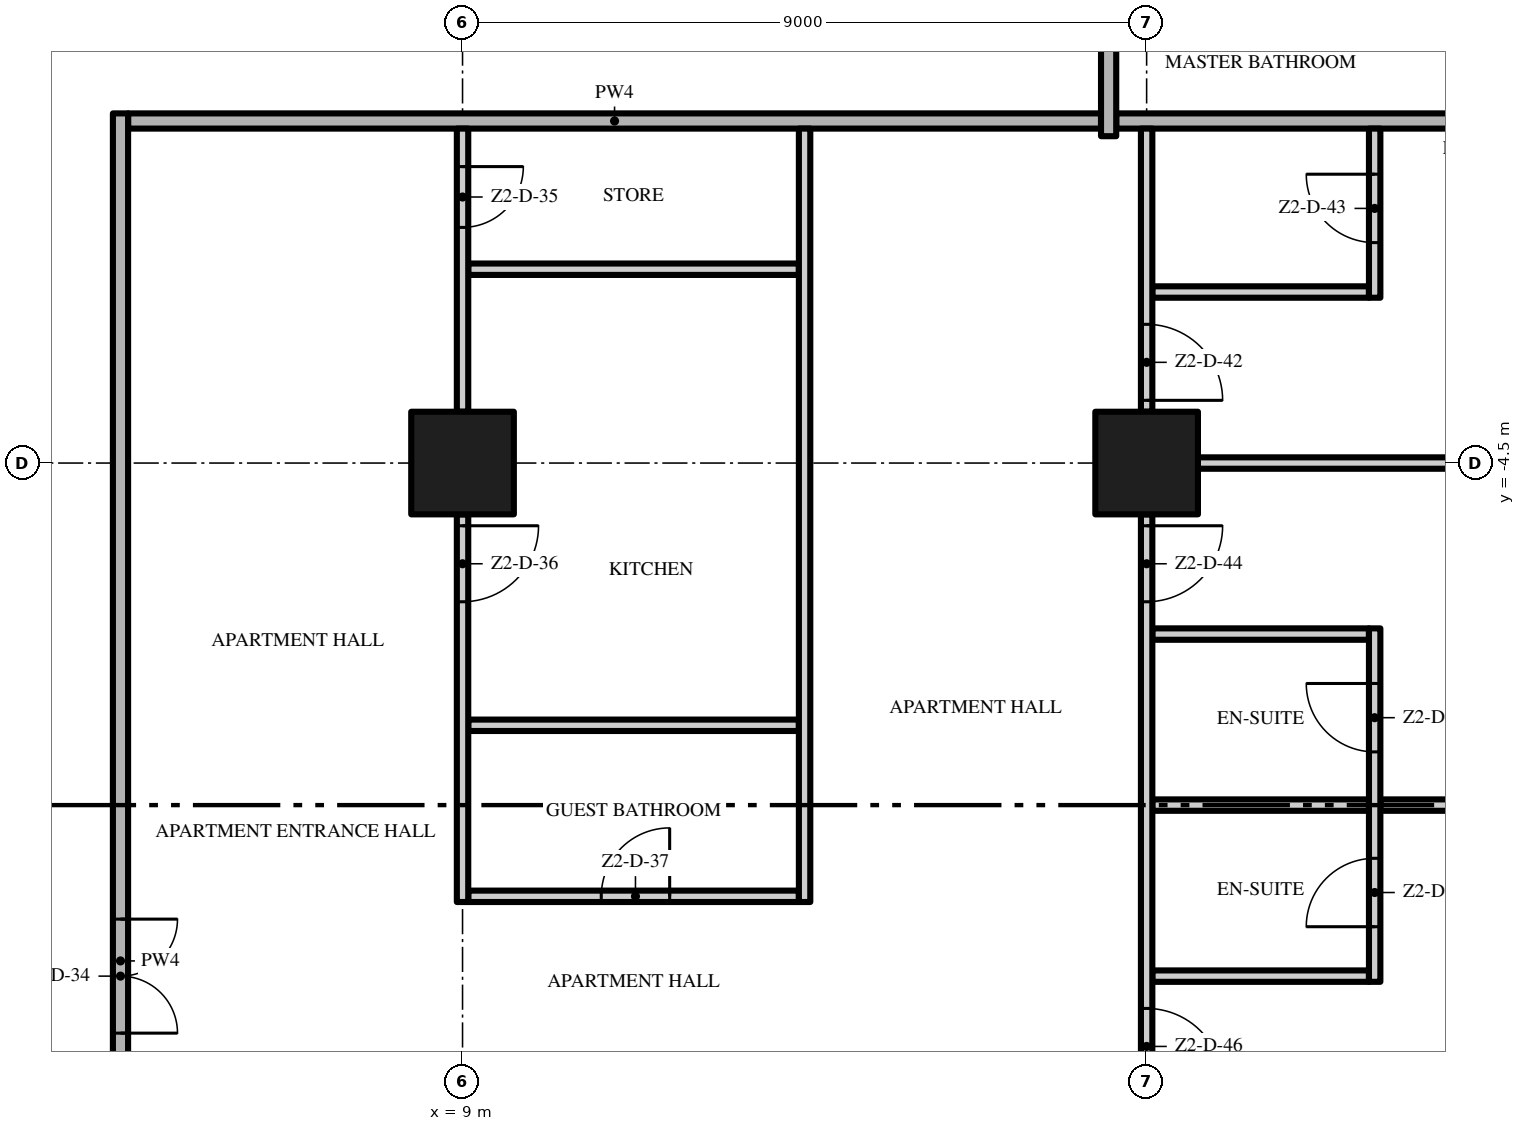
"""IFC4 building model, lengths in metres.
Left out: names, types, materials, properties, quantities, classifications, styles, units other than length and angle.
Written with IfcOpenShell. Run it as: python <this file> out.ifc"""

import sys

from ifc_helpers import new_model, si_unit, direction, frame, frame_2d, origin, origin_2d, place, context, subcontext, project, spatial, rectangle, extrude, element, fill, save


model = new_model("IFC4")
c1 = context("Model", 3, precision=1e-05, world=origin(), true_north=direction((0.0, 1.0)))
c2 = subcontext(c1, "Body", "Model", "MODEL_VIEW")
j1 = project(units=[si_unit("LENGTHUNIT", "METRE"), si_unit("PLANEANGLEUNIT", "RADIAN")], contexts=[c1])
p1 = place(None, origin())
s1 = spatial("IfcSite", under=j1, at=p1, CompositionType="ELEMENT")
p2 = place(p1, origin())
s2 = spatial("IfcBuilding", under=s1, at=p2, CompositionType="ELEMENT")
p3 = place(p2, frame((0.0, 0.0, 103.6)))
s3 = spatial("IfcBuildingStorey", under=s2, at=p3, CompositionType="ELEMENT", Elevation=103.6)
for number, where, z_axis, x_axis in (
    (1, (18.0, -4.5, 0.0), (0.0, 0.0, 1.0), (1.0, 0.0, 0.0)),
    (2, (9.0, -4.5, 0.0), (0.0, 0.0, 1.0), (1.0, 0.0, 0.0)),
):
    element("IfcColumn", number, at=place(p3, frame(where, z_axis=z_axis, x_axis=x_axis)), inside=s3, PredefinedType="COLUMN", context=c2, shape_type="SweptSolid", body=[
        extrude(rectangle(XDim=1.35, YDim=1.35, at=origin_2d()), origin(), (0.0, 0.0, 1.0), 3.5),
    ])
p4 = place(p3, frame((18.075, -11.25, 0.0), z_axis=(0.0, 0.0, 1.0), x_axis=(1.0, 0.0, 0.0)))
e3 = element("IfcWall", 3, at=p4, inside=s3, PredefinedType="PARTITIONING", context=c2, shape_type="SweptSolid", body=[
    extrude(rectangle(XDim=2.85, YDim=0.15, at=frame_2d((1.425, 0.0))), origin(), (0.0, 0.0, 1.0), 3.5),
])
p5 = place(p3, frame((9.075, -10.2, 0.0), z_axis=(0.0, 0.0, 1.0), x_axis=(1.0, 0.0, 0.0)))
e4 = element("IfcWall", 4, at=p5, inside=s3, PredefinedType="PARTITIONING", context=c2, shape_type="SweptSolid", body=[
    extrude(rectangle(XDim=4.35, YDim=0.15, at=frame_2d((2.175, 0.0))), origin(), (0.0, 0.0, 1.0), 3.5),
])
p6 = place(p5, frame((1.75, 0.0, 0.0)))
e5 = element("IfcOpeningElement", 5, at=p6, cuts=e4, PredefinedType="OPENING", context=c2, shape_type="SweptSolid", body=[
    extrude(rectangle(XDim=0.9, YDim=2.1, at=frame_2d((0.45, 1.05))), frame((0.0, 0.085, 0.0), z_axis=(0.0, -1.0, 0.0), x_axis=(1.0, 0.0, 0.0)), (0.0, 0.0, 1.0), 0.17),
])
p7 = place(p3, frame((18.075, -9.0, 0.0), z_axis=(0.0, 0.0, 1.0), x_axis=(1.0, 0.0, 0.0)))
e6 = element("IfcWall", 6, at=p7, inside=s3, PredefinedType="PARTITIONING", context=c2, shape_type="SweptSolid", body=[
    extrude(rectangle(XDim=2.85, YDim=0.15, at=frame_2d((1.425, 0.0))), origin(), (0.0, 0.0, 1.0), 3.5),
])
p8 = place(p3, frame((21.075, -9.0, 0.0), z_axis=(0.0, 0.0, 1.0), x_axis=(1.0, 0.0, 0.0)))
e7 = element("IfcWall", 7, at=p8, inside=s3, PredefinedType="PARTITIONING", context=c2, shape_type="SweptSolid", body=[
    extrude(rectangle(XDim=5.625, YDim=0.15, at=frame_2d((2.812, 0.0))), origin(), (0.0, 0.0, 1.0), 3.5),
])
p9 = place(p3, frame((9.075, -7.95, 0.0), z_axis=(0.0, 0.0, 1.0), x_axis=(1.0, 0.0, 0.0)))
e8 = element("IfcWall", 8, at=p9, inside=s3, PredefinedType="PARTITIONING", context=c2, shape_type="SweptSolid", body=[
    extrude(rectangle(XDim=4.35, YDim=0.15, at=frame_2d((2.175, 0.0))), origin(), (0.0, 0.0, 1.0), 3.5),
])
p10 = place(p3, frame((18.075, -6.75, 0.0), z_axis=(0.0, 0.0, 1.0), x_axis=(1.0, 0.0, 0.0)))
e9 = element("IfcWall", 9, at=p10, inside=s3, PredefinedType="PARTITIONING", context=c2, shape_type="SweptSolid", body=[
    extrude(rectangle(XDim=2.85, YDim=0.15, at=frame_2d((1.425, 0.0))), origin(), (0.0, 0.0, 1.0), 3.5),
])
p11 = place(p3, frame((18.675, -4.5, 0.0), z_axis=(0.0, 0.0, 1.0), x_axis=(1.0, 0.0, 0.0)))
e10 = element("IfcWall", 10, at=p11, inside=s3, PredefinedType="PARTITIONING", context=c2, shape_type="SweptSolid", body=[
    extrude(rectangle(XDim=7.075, YDim=0.15, at=frame_2d((3.538, 0.0))), origin(), (0.0, 0.0, 1.0), 3.5),
])
p12 = place(p3, frame((18.075, -2.25, 0.0), z_axis=(0.0, 0.0, 1.0), x_axis=(1.0, 0.0, 0.0)))
e11 = element("IfcWall", 11, at=p12, inside=s3, PredefinedType="PARTITIONING", context=c2, shape_type="SweptSolid", body=[
    extrude(rectangle(XDim=2.85, YDim=0.15, at=frame_2d((1.425, 0.0))), origin(), (0.0, 0.0, 1.0), 3.5),
])
p13 = place(p3, frame((9.075, -1.95, 0.0), z_axis=(0.0, 0.0, 1.0), x_axis=(1.0, 0.0, 0.0)))
e12 = element("IfcWall", 12, at=p13, inside=s3, PredefinedType="PARTITIONING", context=c2, shape_type="SweptSolid", body=[
    extrude(rectangle(XDim=4.35, YDim=0.15, at=frame_2d((2.175, 0.0))), origin(), (0.0, 0.0, 1.0), 3.5),
])
p14 = place(p3, frame((4.6, 0.0, 0.0), z_axis=(0.0, 0.0, 1.0), x_axis=(1.0, 0.0, 0.0)))
e13 = element("IfcWall", 13, at=p14, inside=s3, PredefinedType="PARTITIONING", context=c2, shape_type="SweptSolid", body=[
    extrude(rectangle(XDim=12.8, YDim=0.2, at=frame_2d((6.4, 0.0))), origin(), (0.0, 0.0, 1.0), 3.5),
])
p15 = place(p3, frame((17.6, 0.0, 0.0), z_axis=(0.0, 0.0, 1.0), x_axis=(1.0, 0.0, 0.0)))
e14 = element("IfcWall", 14, at=p15, inside=s3, PredefinedType="PARTITIONING", context=c2, shape_type="SweptSolid", body=[
    extrude(rectangle(XDim=9.1, YDim=0.2, at=frame_2d((4.55, 0.0))), origin(), (0.0, 0.0, 1.0), 3.5),
])
p16 = place(p3, frame((4.5, 0.1, 0.0), z_axis=(0.0, 0.0, 1.0), x_axis=(0.0, -1.0, 0.0)))
e15 = element("IfcWall", 15, at=p16, inside=s3, PredefinedType="PARTITIONING", context=c2, shape_type="SweptSolid", body=[
    extrude(rectangle(XDim=22.3, YDim=0.2, at=frame_2d((11.15, 0.0))), origin(), (0.0, 0.0, 1.0), 3.5),
])
p17 = place(p16, frame((10.6, 0.0, 0.0)))
e16 = element("IfcOpeningElement", 16, at=p17, cuts=e15, PredefinedType="OPENING", context=c2, shape_type="SweptSolid", body=[
    extrude(rectangle(XDim=1.5, YDim=2.4, at=frame_2d((0.75, 1.2))), frame((0.0, 0.11, 0.0), z_axis=(0.0, -1.0, 0.0), x_axis=(1.0, 0.0, 0.0)), (0.0, 0.0, 1.0), 0.22),
])
p18 = place(p3, frame((9.0, -5.175, 0.0), z_axis=(0.0, 0.0, 1.0), x_axis=(0.0, -1.0, 0.0)))
e17 = element("IfcWall", 17, at=p18, inside=s3, PredefinedType="PARTITIONING", context=c2, shape_type="SweptSolid", body=[
    extrude(rectangle(XDim=5.1, YDim=0.15, at=frame_2d((2.55, 0.0))), origin(), (0.0, 0.0, 1.0), 3.5),
])
p19 = place(p18, frame((0.15, 0.0, 0.0)))
e18 = element("IfcOpeningElement", 18, at=p19, cuts=e17, PredefinedType="OPENING", context=c2, shape_type="SweptSolid", body=[
    extrude(rectangle(XDim=1.0, YDim=2.4, at=frame_2d((0.5, 1.2))), frame((0.0, 0.085, 0.0), z_axis=(0.0, -1.0, 0.0), x_axis=(1.0, 0.0, 0.0)), (0.0, 0.0, 1.0), 0.17),
])
p20 = place(p3, frame((9.0, -0.1, 0.0), z_axis=(0.0, 0.0, 1.0), x_axis=(0.0, -1.0, 0.0)))
e19 = element("IfcWall", 19, at=p20, inside=s3, PredefinedType="PARTITIONING", context=c2, shape_type="SweptSolid", body=[
    extrude(rectangle(XDim=3.725, YDim=0.15, at=frame_2d((1.863, 0.0))), origin(), (0.0, 0.0, 1.0), 3.5),
])
p21 = place(p20, frame((0.5, 0.0, 0.0)))
e20 = element("IfcOpeningElement", 20, at=p21, cuts=e19, PredefinedType="OPENING", context=c2, shape_type="SweptSolid", body=[
    extrude(rectangle(XDim=0.8, YDim=2.0, at=frame_2d((0.4, 1.0))), frame((0.0, 0.085, 0.0), z_axis=(0.0, -1.0, 0.0), x_axis=(1.0, 0.0, 0.0)), (0.0, 0.0, 1.0), 0.17),
])
p22 = place(p3, frame((13.5, -10.275, 0.0), z_axis=(0.0, 0.0, 1.0), x_axis=(0.0, 1.0, 0.0)))
e21 = element("IfcWall", 21, at=p22, inside=s3, PredefinedType="PARTITIONING", context=c2, shape_type="SweptSolid", body=[
    extrude(rectangle(XDim=10.175, YDim=0.15, at=frame_2d((5.088, 0.0))), origin(), (0.0, 0.0, 1.0), 3.5),
])
p23 = place(p3, frame((17.5, -0.2, 0.0), z_axis=(0.0, 0.0, 1.0), x_axis=(0.0, 1.0, 0.0)))
e22 = element("IfcWall", 22, at=p23, inside=s3, PredefinedType="PARTITIONING", context=c2, shape_type="SweptSolid", body=[
    extrude(rectangle(XDim=4.025, YDim=0.2, at=frame_2d((2.013, 0.0))), origin(), (0.0, 0.0, 1.0), 3.5),
])
p24 = place(p3, frame((18.0, -5.175, 0.0), z_axis=(0.0, 0.0, 1.0), x_axis=(0.0, -1.0, 0.0)))
e23 = element("IfcWall", 23, at=p24, inside=s3, PredefinedType="PARTITIONING", context=c2, shape_type="SweptSolid", body=[
    extrude(rectangle(XDim=7.65, YDim=0.15, at=frame_2d((3.825, 0.0))), origin(), (0.0, 0.0, 1.0), 3.5),
])
p25 = place(p24, frame((0.15, 0.0, 0.0)))
e24 = element("IfcOpeningElement", 24, at=p25, cuts=e23, PredefinedType="OPENING", context=c2, shape_type="SweptSolid", body=[
    extrude(rectangle(XDim=1.0, YDim=2.4, at=frame_2d((0.5, 1.2))), frame((0.0, 0.085, 0.0), z_axis=(0.0, -1.0, 0.0), x_axis=(1.0, 0.0, 0.0)), (0.0, 0.0, 1.0), 0.17),
])
p26 = place(p24, frame((6.5, 0.0, 0.0)))
e25 = element("IfcOpeningElement", 25, at=p26, cuts=e23, PredefinedType="OPENING", context=c2, shape_type="SweptSolid", body=[
    extrude(rectangle(XDim=1.0, YDim=2.4, at=frame_2d((0.5, 1.2))), frame((0.0, 0.085, 0.0), z_axis=(0.0, -1.0, 0.0), x_axis=(1.0, 0.0, 0.0)), (0.0, 0.0, 1.0), 0.17),
])
p27 = place(p3, frame((18.0, -0.1, 0.0), z_axis=(0.0, 0.0, 1.0), x_axis=(0.0, -1.0, 0.0)))
e26 = element("IfcWall", 26, at=p27, inside=s3, PredefinedType="PARTITIONING", context=c2, shape_type="SweptSolid", body=[
    extrude(rectangle(XDim=3.725, YDim=0.15, at=frame_2d((1.863, 0.0))), origin(), (0.0, 0.0, 1.0), 3.5),
])
p28 = place(p27, frame((2.575, 0.0, 0.0)))
e27 = element("IfcOpeningElement", 27, at=p28, cuts=e26, PredefinedType="OPENING", context=c2, shape_type="SweptSolid", body=[
    extrude(rectangle(XDim=1.0, YDim=2.4, at=frame_2d((0.5, 1.2))), frame((0.0, 0.085, 0.0), z_axis=(0.0, -1.0, 0.0), x_axis=(1.0, 0.0, 0.0)), (0.0, 0.0, 1.0), 0.17),
])
p29 = place(p3, frame((21.0, -11.325, 0.0), z_axis=(0.0, 0.0, 1.0), x_axis=(0.0, 1.0, 0.0)))
e28 = element("IfcWall", 28, at=p29, inside=s3, PredefinedType="PARTITIONING", context=c2, shape_type="SweptSolid", body=[
    extrude(rectangle(XDim=4.65, YDim=0.15, at=frame_2d((2.325, 0.0))), origin(), (0.0, 0.0, 1.0), 3.5),
])
p30 = place(p29, frame((3.025, 0.0, 0.0)))
e29 = element("IfcOpeningElement", 29, at=p30, cuts=e28, PredefinedType="OPENING", context=c2, shape_type="SweptSolid", body=[
    extrude(rectangle(XDim=0.9, YDim=2.1, at=frame_2d((0.45, 1.05))), frame((0.0, 0.085, 0.0), z_axis=(0.0, -1.0, 0.0), x_axis=(1.0, 0.0, 0.0)), (0.0, 0.0, 1.0), 0.17),
])
p31 = place(p29, frame((0.725, 0.0, 0.0)))
e30 = element("IfcOpeningElement", 30, at=p31, cuts=e28, PredefinedType="OPENING", context=c2, shape_type="SweptSolid", body=[
    extrude(rectangle(XDim=0.9, YDim=2.1, at=frame_2d((0.45, 1.05))), frame((0.0, 0.085, 0.0), z_axis=(0.0, -1.0, 0.0), x_axis=(1.0, 0.0, 0.0)), (0.0, 0.0, 1.0), 0.17),
])
p32 = place(p3, frame((21.0, -2.325, 0.0), z_axis=(0.0, 0.0, 1.0), x_axis=(0.0, 1.0, 0.0)))
e31 = element("IfcWall", 31, at=p32, inside=s3, PredefinedType="PARTITIONING", context=c2, shape_type="SweptSolid", body=[
    extrude(rectangle(XDim=2.225, YDim=0.15, at=frame_2d((1.113, 0.0))), origin(), (0.0, 0.0, 1.0), 3.5),
])
p33 = place(p32, frame((0.725, 0.0, 0.0)))
e32 = element("IfcOpeningElement", 32, at=p33, cuts=e31, PredefinedType="OPENING", context=c2, shape_type="SweptSolid", body=[
    extrude(rectangle(XDim=0.9, YDim=2.1, at=frame_2d((0.45, 1.05))), frame((0.0, 0.085, 0.0), z_axis=(0.0, -1.0, 0.0), x_axis=(1.0, 0.0, 0.0)), (0.0, 0.0, 1.0), 0.17),
])
p34 = place(p17, origin())
e33 = element("IfcDoor", 33, at=p34, inside=s3, OperationType="DOUBLE_DOOR_SINGLE_SWING", PredefinedType="DOOR", context=c2, shape_type="SweptSolid", body=[
    extrude(rectangle(XDim=1.5, YDim=2.4, at=frame_2d((0.75, 1.2))), frame((0.0, 0.025, 0.0), z_axis=(0.0, -1.0, 0.0), x_axis=(1.0, 0.0, 0.0)), (0.0, 0.0, 1.0), 0.05),
])
fill(e16, e33)
p35 = place(p21, origin())
e34 = element("IfcDoor", 34, at=p35, inside=s3, OperationType="SINGLE_SWING_LEFT", PredefinedType="DOOR", context=c2, shape_type="SweptSolid", body=[
    extrude(rectangle(XDim=0.8, YDim=2.0, at=frame_2d((0.4, 1.0))), frame((0.0, 0.025, 0.0), z_axis=(0.0, -1.0, 0.0), x_axis=(1.0, 0.0, 0.0)), (0.0, 0.0, 1.0), 0.05),
])
fill(e20, e34)
p36 = place(p19, origin())
e35 = element("IfcDoor", 35, at=p36, inside=s3, OperationType="SINGLE_SWING_LEFT", PredefinedType="DOOR", context=c2, shape_type="SweptSolid", body=[
    extrude(rectangle(XDim=1.0, YDim=2.4, at=frame_2d((0.5, 1.2))), frame((0.0, 0.025, 0.0), z_axis=(0.0, -1.0, 0.0), x_axis=(1.0, 0.0, 0.0)), (0.0, 0.0, 1.0), 0.05),
])
fill(e18, e35)
p37 = place(p6, origin())
e36 = element("IfcDoor", 36, at=p37, inside=s3, OperationType="SINGLE_SWING_RIGHT", PredefinedType="DOOR", context=c2, shape_type="SweptSolid", body=[
    extrude(rectangle(XDim=0.9, YDim=2.1, at=frame_2d((0.45, 1.05))), frame((0.0, 0.025, 0.0), z_axis=(0.0, -1.0, 0.0), x_axis=(1.0, 0.0, 0.0)), (0.0, 0.0, 1.0), 0.05),
])
fill(e5, e36)
p38 = place(p28, origin())
e37 = element("IfcDoor", 37, at=p38, inside=s3, OperationType="SINGLE_SWING_RIGHT", PredefinedType="DOOR", context=c2, shape_type="SweptSolid", body=[
    extrude(rectangle(XDim=1.0, YDim=2.4, at=frame_2d((0.5, 1.2))), frame((0.0, 0.025, 0.0), z_axis=(0.0, -1.0, 0.0), x_axis=(1.0, 0.0, 0.0)), (0.0, 0.0, 1.0), 0.05),
])
fill(e27, e37)
p39 = place(p33, origin())
e38 = element("IfcDoor", 38, at=p39, inside=s3, OperationType="SINGLE_SWING_RIGHT", PredefinedType="DOOR", context=c2, shape_type="SweptSolid", body=[
    extrude(rectangle(XDim=0.9, YDim=2.1, at=frame_2d((0.45, 1.05))), frame((0.0, 0.025, 0.0), z_axis=(0.0, -1.0, 0.0), x_axis=(1.0, 0.0, 0.0)), (0.0, 0.0, 1.0), 0.05),
])
fill(e32, e38)
p40 = place(p25, origin())
e39 = element("IfcDoor", 39, at=p40, inside=s3, OperationType="SINGLE_SWING_LEFT", PredefinedType="DOOR", context=c2, shape_type="SweptSolid", body=[
    extrude(rectangle(XDim=1.0, YDim=2.4, at=frame_2d((0.5, 1.2))), frame((0.0, 0.025, 0.0), z_axis=(0.0, -1.0, 0.0), x_axis=(1.0, 0.0, 0.0)), (0.0, 0.0, 1.0), 0.05),
])
fill(e24, e39)
p41 = place(p30, origin())
e40 = element("IfcDoor", 40, at=p41, inside=s3, OperationType="SINGLE_SWING_RIGHT", PredefinedType="DOOR", context=c2, shape_type="SweptSolid", body=[
    extrude(rectangle(XDim=0.9, YDim=2.1, at=frame_2d((0.45, 1.05))), frame((0.0, 0.025, 0.0), z_axis=(0.0, -1.0, 0.0), x_axis=(1.0, 0.0, 0.0)), (0.0, 0.0, 1.0), 0.05),
])
fill(e29, e40)
p42 = place(p26, origin())
e41 = element("IfcDoor", 41, at=p42, inside=s3, OperationType="SINGLE_SWING_RIGHT", PredefinedType="DOOR", context=c2, shape_type="SweptSolid", body=[
    extrude(rectangle(XDim=1.0, YDim=2.4, at=frame_2d((0.5, 1.2))), frame((0.0, 0.025, 0.0), z_axis=(0.0, -1.0, 0.0), x_axis=(1.0, 0.0, 0.0)), (0.0, 0.0, 1.0), 0.05),
])
fill(e25, e41)
p43 = place(p31, origin())
e42 = element("IfcDoor", 42, at=p43, inside=s3, OperationType="SINGLE_SWING_LEFT", PredefinedType="DOOR", context=c2, shape_type="SweptSolid", body=[
    extrude(rectangle(XDim=0.9, YDim=2.1, at=frame_2d((0.45, 1.05))), frame((0.0, 0.025, 0.0), z_axis=(0.0, -1.0, 0.0), x_axis=(1.0, 0.0, 0.0)), (0.0, 0.0, 1.0), 0.05),
])
fill(e30, e42)
save(model, sys.argv[1])
